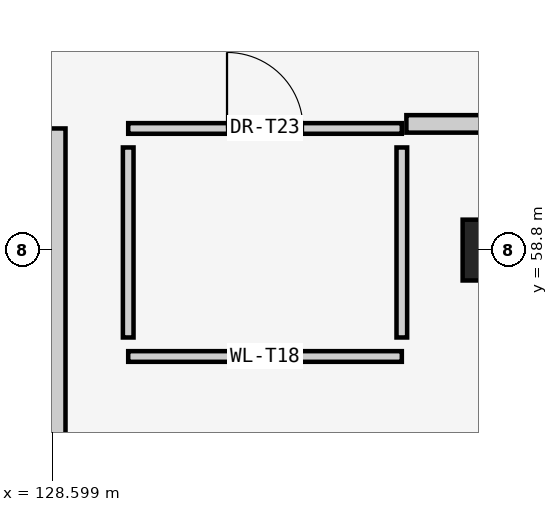
"""IFC4 building model, lengths in metres.
Left out: names, types, materials, properties, quantities, classifications, styles, units other than length and angle.
Written with IfcOpenShell. Run it as: python <this file> out.ifc"""

import sys

from ifc_helpers import new_model, si_unit, direction, frame, frame_2d, origin, origin_2d, place, context, subcontext, project, spatial, rectangle, extrude, element, fill, save


model = new_model("IFC4")
c1 = context("Model", 3, precision=1e-05, world=origin(), true_north=direction((0.0, 1.0)))
c2 = subcontext(c1, "Body", "Model", "MODEL_VIEW")
j1 = project(units=[si_unit("LENGTHUNIT", "METRE"), si_unit("PLANEANGLEUNIT", "RADIAN")], contexts=[c1])
p1 = place(None, origin())
s1 = spatial("IfcSite", under=j1, at=p1, CompositionType="ELEMENT")
p2 = place(p1, origin())
s2 = spatial("IfcBuilding", under=s1, at=p2, CompositionType="ELEMENT")
p3 = place(p2, frame((0.0, 0.0, 5.4)))
s3 = spatial("IfcBuildingStorey", under=s2, at=p3, CompositionType="ELEMENT", Elevation=5.4)
p4 = place(p3, frame((134.4, 58.8, 0.0), z_axis=(0.0, 0.0, 1.0), x_axis=(1.0, 0.0, 0.0)))
e1 = element("IfcColumn", 1, at=p4, inside=s3, PredefinedType="COLUMN", context=c2, shape_type="SweptSolid", body=[
    extrude(rectangle(XDim=0.8, YDim=0.8, at=origin_2d()), origin(), (0.0, 0.0, 1.0), 4.54),
])
p5 = place(p3, frame((129.6, 57.4, 0.0), z_axis=(0.0, 0.0, 1.0), x_axis=(1.0, 0.0, 0.0)))
e2 = element("IfcWall", 2, at=p5, inside=s3, PredefinedType="PARTITIONING", context=c2, shape_type="SweptSolid", body=[
    extrude(rectangle(XDim=3.6, YDim=0.14, at=frame_2d((1.8, 0.0))), origin(), (0.0, 0.0, 1.0), 4.32),
])
p6 = place(p3, frame((129.6, 60.4, 0.0), z_axis=(0.0, 0.0, 1.0), x_axis=(1.0, 0.0, 0.0)))
e3 = element("IfcWall", 3, at=p6, inside=s3, PredefinedType="PARTITIONING", context=c2, shape_type="SweptSolid", body=[
    extrude(rectangle(XDim=3.6, YDim=0.14, at=frame_2d((1.8, 0.0))), origin(), (0.0, 0.0, 1.0), 4.32),
])
p7 = place(p6, frame((1.3, 0.0, 0.0)))
e4 = element("IfcOpeningElement", 4, at=p7, cuts=e3, PredefinedType="OPENING", context=c2, shape_type="SweptSolid", body=[
    extrude(rectangle(XDim=1.0, YDim=2.15, at=frame_2d((0.5, 1.075))), frame((0.0, 0.08, 0.0), z_axis=(0.0, -1.0, 0.0), x_axis=(1.0, 0.0, 0.0)), (0.0, 0.0, 1.0), 0.16),
])
for number, where, z_axis, x_axis in (
    (5, (129.6, 57.65, 0.0), (0.0, 0.0, 1.0), (0.0, 1.0, 0.0)),
    (6, (133.2, 57.65, 0.0), (0.0, 0.0, 1.0), (0.0, 1.0, 0.0)),
):
    element("IfcWall", number, at=place(p3, frame(where, z_axis=z_axis, x_axis=x_axis)), inside=s3, PredefinedType="PARTITIONING", context=c2, shape_type="SweptSolid", body=[
        extrude(rectangle(XDim=2.5, YDim=0.14, at=frame_2d((1.25, 0.0))), origin(), (0.0, 0.0, 1.0), 4.32),
    ])
p8 = place(p3, frame((133.26, 60.46, 0.0), z_axis=(0.0, 0.0, 1.0), x_axis=(1.0, 0.0, 0.0)))
e7 = element("IfcWall", 7, at=p8, inside=s3, PredefinedType="SOLIDWALL", context=c2, shape_type="SweptSolid", body=[
    extrude(rectangle(XDim=10.35, YDim=0.23, at=frame_2d((5.175, 0.0))), origin(), (0.0, 0.0, 1.0), 4.48),
])
p9 = place(p3, frame((128.66, 55.6, 0.0), z_axis=(0.0, 0.0, 1.0), x_axis=(0.0, 1.0, 0.0)))
e8 = element("IfcWall", 8, at=p9, inside=s3, PredefinedType="SOLIDWALL", context=c2, shape_type="SweptSolid", body=[
    extrude(rectangle(XDim=4.8, YDim=0.23, at=frame_2d((2.4, 0.0))), origin(), (0.0, 0.0, 1.0), 4.48),
])
p10 = place(p7, origin())
e9 = element("IfcDoor", 9, at=p10, inside=s3, OperationType="SINGLE_SWING_LEFT", PredefinedType="DOOR", context=c2, shape_type="SweptSolid", body=[
    extrude(rectangle(XDim=1.0, YDim=2.15, at=frame_2d((0.5, 1.075))), frame((0.0, 0.025, 0.0), z_axis=(0.0, -1.0, 0.0), x_axis=(1.0, 0.0, 0.0)), (0.0, 0.0, 1.0), 0.05),
])
fill(e4, e9)
save(model, sys.argv[1])
